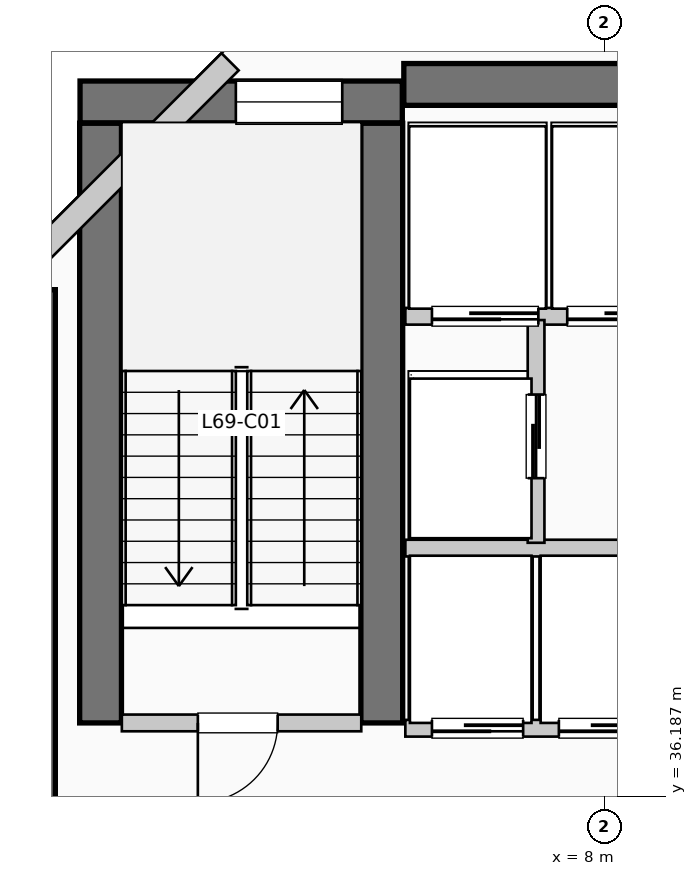
"""IFC4 building model, lengths in metres.
Left out: names, types, materials, properties, quantities, classifications, styles, units other than length and angle.
Written with IfcOpenShell. Run it as: python <this file> out.ifc"""

import sys

from ifc_helpers import new_model, si_unit, direction, frame, frame_2d, origin, place, context, subcontext, project, spatial, rectangle, extrude, element, fill, save


model = new_model("IFC4")
c1 = context("Model", 3, precision=1e-05, world=origin(), true_north=direction((0.0, 1.0)))
c2 = subcontext(c1, "Body", "Model", "MODEL_VIEW")
j1 = project(units=[si_unit("LENGTHUNIT", "METRE"), si_unit("PLANEANGLEUNIT", "RADIAN")], contexts=[c1])
p1 = place(None, origin())
s1 = spatial("IfcSite", under=j1, at=p1, CompositionType="ELEMENT")
p2 = place(p1, origin())
s2 = spatial("IfcBuilding", under=s1, at=p2, CompositionType="ELEMENT")
p3 = place(p2, frame((0.0, 0.0, 284.13)))
s3 = spatial("IfcBuildingStorey", under=s2, at=p3, CompositionType="ELEMENT", Elevation=284.13)
p4 = place(p3, frame((5.36, 45.55, 0.0), z_axis=(0.0, 0.0, 1.0), x_axis=(1.0, 0.0, 0.0)))
e1 = element("IfcWall", 1, at=p4, inside=s3, PredefinedType="SHEAR", context=c2, shape_type="SweptSolid", body=[
    extrude(rectangle(XDim=13.98, YDim=0.55, at=frame_2d((6.99, 0.0))), origin(), (0.0, 0.0, 1.0), 3.96),
])
p5 = place(p3, frame((0.5, 34.95, 0.0), z_axis=(0.0, 0.0, 1.0), x_axis=(0.0, 1.0, 0.0)))
e2 = element("IfcWall", 2, at=p5, inside=s3, PredefinedType="SHEAR", context=c2, shape_type="SweptSolid", body=[
    extrude(rectangle(XDim=7.9, YDim=0.55, at=frame_2d((3.95, 0.0))), origin(), (0.0, 0.0, 1.0), 3.96),
])
for number, where, z_axis, x_axis in (
    (3, (1.37, 37.15, 0.0), (0.0, 0.0, 1.0), (0.0, 1.0, 0.0)),
    (4, (5.07, 37.15, 0.0), (0.0, 0.0, 1.0), (0.0, 1.0, 0.0)),
):
    element("IfcWall", number, at=place(p3, frame(where, z_axis=z_axis, x_axis=x_axis)), inside=s3, PredefinedType="SHEAR", context=c2, shape_type="SweptSolid", body=[
        extrude(rectangle(XDim=7.89, YDim=0.55, at=frame_2d((3.945, 0.0))), origin(), (0.0, 0.0, 1.0), 3.96),
    ])
p6 = place(p3, frame((1.1, 45.32, 0.0), z_axis=(0.0, 0.0, 1.0), x_axis=(1.0, 0.0, 0.0)))
e5 = element("IfcWall", 5, at=p6, inside=s3, PredefinedType="SHEAR", context=c2, shape_type="SweptSolid", body=[
    extrude(rectangle(XDim=4.24, YDim=0.55, at=frame_2d((2.12, 0.0))), origin(), (0.0, 0.0, 1.0), 3.96),
])
p7 = place(p6, frame((2.05, 0.0, 1.05)))
e6 = element("IfcOpeningElement", 6, at=p7, cuts=e5, PredefinedType="OPENING", context=c2, shape_type="SweptSolid", body=[
    extrude(rectangle(XDim=1.4, YDim=1.8, at=frame_2d((0.7, 0.9))), frame((0.0, 0.285, 0.0), z_axis=(0.0, -1.0, 0.0), x_axis=(1.0, 0.0, 0.0)), (0.0, 0.0, 1.0), 0.57),
])
p8 = place(p3, frame((3.074, 45.848, 0.0), z_axis=(0.0, 0.0, 1.0), x_axis=(-0.707106781187, -0.707106781187, 0.0)))
e7 = element("IfcWall", 7, at=p8, inside=s3, PredefinedType="SOLIDWALL", context=c2, shape_type="SweptSolid", body=[
    extrude(rectangle(XDim=4.133, YDim=0.32, at=frame_2d((2.066, 0.0))), origin(), (0.0, 0.0, 1.0), 3.74),
])
p9 = place(p3, frame((1.65, 37.15, 0.0), z_axis=(0.0, 0.0, 1.0), x_axis=(1.0, 0.0, 0.0)))
e8 = element("IfcWall", 8, at=p9, inside=s3, PredefinedType="PARTITIONING", context=c2, shape_type="SweptSolid", body=[
    extrude(rectangle(XDim=3.15, YDim=0.22, at=frame_2d((1.575, 0.0))), origin(), (0.0, 0.0, 1.0), 3.74),
])
p10 = place(p9, frame((2.05, 0.0, 0.0), z_axis=(0.0, 0.0, 1.0), x_axis=(-1.0, 0.0, 0.0)))
e9 = element("IfcOpeningElement", 9, at=p10, cuts=e8, PredefinedType="OPENING", context=c2, shape_type="SweptSolid", body=[
    extrude(rectangle(XDim=1.05, YDim=2.15, at=frame_2d((0.525, 1.075))), frame((0.0, 0.12, 0.0), z_axis=(0.0, -1.0, 0.0), x_axis=(1.0, 0.0, 0.0)), (0.0, 0.0, 1.0), 0.24),
])
p11 = place(p3, frame((5.38, 37.08, 0.0), z_axis=(0.0, 0.0, 1.0), x_axis=(1.0, 0.0, 0.0)))
e10 = element("IfcWall", 10, at=p11, inside=s3, PredefinedType="PARTITIONING", context=c2, shape_type="SweptSolid", body=[
    extrude(rectangle(XDim=3.46, YDim=0.22, at=frame_2d((1.73, 0.0))), origin(), (0.0, 0.0, 1.0), 3.74),
])
p12 = place(p11, frame((1.55, 0.0, 0.0), z_axis=(0.0, 0.0, 1.0), x_axis=(-1.0, 0.0, 0.0)))
e11 = element("IfcOpeningElement", 11, at=p12, cuts=e10, PredefinedType="OPENING", context=c2, shape_type="SweptSolid", body=[
    extrude(rectangle(XDim=1.2, YDim=2.2, at=frame_2d((0.6, 1.1))), frame((0.0, 0.12, 0.0), z_axis=(0.0, -1.0, 0.0), x_axis=(1.0, 0.0, 0.0)), (0.0, 0.0, 1.0), 0.24),
])
p13 = place(p11, frame((3.22, 0.0, 0.0), z_axis=(0.0, 0.0, 1.0), x_axis=(-1.0, 0.0, 0.0)))
e12 = element("IfcOpeningElement", 12, at=p13, cuts=e10, PredefinedType="OPENING", context=c2, shape_type="SweptSolid", body=[
    extrude(rectangle(XDim=1.2, YDim=2.2, at=frame_2d((0.6, 1.1))), frame((0.0, 0.12, 0.0), z_axis=(0.0, -1.0, 0.0), x_axis=(1.0, 0.0, 0.0)), (0.0, 0.0, 1.0), 0.24),
])
p14 = place(p3, frame((5.38, 39.45, 0.0), z_axis=(0.0, 0.0, 1.0), x_axis=(1.0, 0.0, 0.0)))
e13 = element("IfcWall", 13, at=p14, inside=s3, PredefinedType="PARTITIONING", context=c2, shape_type="SweptSolid", body=[
    extrude(rectangle(XDim=3.46, YDim=0.22, at=frame_2d((1.73, 0.0))), origin(), (0.0, 0.0, 1.0), 3.74),
])
p15 = place(p3, frame((5.38, 42.5, 0.0), z_axis=(0.0, 0.0, 1.0), x_axis=(1.0, 0.0, 0.0)))
e14 = element("IfcWall", 14, at=p15, inside=s3, PredefinedType="PARTITIONING", context=c2, shape_type="SweptSolid", body=[
    extrude(rectangle(XDim=3.77, YDim=0.22, at=frame_2d((1.885, 0.0))), origin(), (0.0, 0.0, 1.0), 3.74),
])
p16 = place(p15, frame((1.75, 0.0, 0.0), z_axis=(0.0, 0.0, 1.0), x_axis=(-1.0, 0.0, 0.0)))
e15 = element("IfcOpeningElement", 15, at=p16, cuts=e14, PredefinedType="OPENING", context=c2, shape_type="SweptSolid", body=[
    extrude(rectangle(XDim=1.4, YDim=2.2, at=frame_2d((0.7, 1.1))), frame((0.0, 0.12, 0.0), z_axis=(0.0, -1.0, 0.0), x_axis=(1.0, 0.0, 0.0)), (0.0, 0.0, 1.0), 0.24),
])
p17 = place(p15, frame((3.53, 0.0, 0.0), z_axis=(0.0, 0.0, 1.0), x_axis=(-1.0, 0.0, 0.0)))
e16 = element("IfcOpeningElement", 16, at=p17, cuts=e14, PredefinedType="OPENING", context=c2, shape_type="SweptSolid", body=[
    extrude(rectangle(XDim=1.4, YDim=2.2, at=frame_2d((0.7, 1.1))), frame((0.0, 0.12, 0.0), z_axis=(0.0, -1.0, 0.0), x_axis=(1.0, 0.0, 0.0)), (0.0, 0.0, 1.0), 0.24),
])
p18 = place(p3, frame((7.1, 39.52, 0.0), z_axis=(0.0, 0.0, 1.0), x_axis=(0.0, 1.0, 0.0)))
e17 = element("IfcWall", 17, at=p18, inside=s3, PredefinedType="PARTITIONING", context=c2, shape_type="SweptSolid", body=[
    extrude(rectangle(XDim=2.93, YDim=0.22, at=frame_2d((1.465, 0.0))), origin(), (0.0, 0.0, 1.0), 3.74),
])
p19 = place(p18, frame((0.85, 0.0, 0.0)))
e18 = element("IfcOpeningElement", 18, at=p19, cuts=e17, PredefinedType="OPENING", context=c2, shape_type="SweptSolid", body=[
    extrude(rectangle(XDim=1.1, YDim=2.2, at=frame_2d((0.55, 1.1))), frame((0.0, 0.12, 0.0), z_axis=(0.0, -1.0, 0.0), x_axis=(1.0, 0.0, 0.0)), (0.0, 0.0, 1.0), 0.24),
])
p20 = place(p7, origin())
e19 = element("IfcWindow", 19, at=p20, inside=s3, PartitioningType="SINGLE_PANEL", PredefinedType="WINDOW", context=c2, shape_type="SweptSolid", body=[
    extrude(rectangle(XDim=1.4, YDim=1.8, at=frame_2d((0.7, 0.9))), frame((0.0, 0.03, 0.0), z_axis=(0.0, -1.0, 0.0), x_axis=(1.0, 0.0, 0.0)), (0.0, 0.0, 1.0), 0.06),
])
fill(e6, e19)
p21 = place(p10, origin())
e20 = element("IfcDoor", 20, at=p21, inside=s3, OperationType="SINGLE_SWING_LEFT", PredefinedType="DOOR", context=c2, shape_type="SweptSolid", body=[
    extrude(rectangle(XDim=1.05, YDim=2.15, at=frame_2d((0.525, 1.075))), frame((0.0, 0.025, 0.0), z_axis=(0.0, -1.0, 0.0), x_axis=(1.0, 0.0, 0.0)), (0.0, 0.0, 1.0), 0.05),
])
fill(e9, e20)
p22 = place(p12, origin())
e21 = element("IfcDoor", 21, at=p22, inside=s3, OperationType="SLIDING_TO_RIGHT", PredefinedType="DOOR", context=c2, shape_type="SweptSolid", body=[
    extrude(rectangle(XDim=1.2, YDim=2.2, at=frame_2d((0.6, 1.1))), frame((0.0, 0.025, 0.0), z_axis=(0.0, -1.0, 0.0), x_axis=(1.0, 0.0, 0.0)), (0.0, 0.0, 1.0), 0.05),
])
fill(e11, e21)
p23 = place(p13, origin())
e22 = element("IfcDoor", 22, at=p23, inside=s3, OperationType="SLIDING_TO_RIGHT", PredefinedType="DOOR", context=c2, shape_type="SweptSolid", body=[
    extrude(rectangle(XDim=1.2, YDim=2.2, at=frame_2d((0.6, 1.1))), frame((0.0, 0.025, 0.0), z_axis=(0.0, -1.0, 0.0), x_axis=(1.0, 0.0, 0.0)), (0.0, 0.0, 1.0), 0.05),
])
fill(e12, e22)
p24 = place(p16, origin())
e23 = element("IfcDoor", 23, at=p24, inside=s3, OperationType="SLIDING_TO_LEFT", PredefinedType="DOOR", context=c2, shape_type="SweptSolid", body=[
    extrude(rectangle(XDim=1.4, YDim=2.2, at=frame_2d((0.7, 1.1))), frame((0.0, 0.025, 0.0), z_axis=(0.0, -1.0, 0.0), x_axis=(1.0, 0.0, 0.0)), (0.0, 0.0, 1.0), 0.05),
])
fill(e15, e23)
p25 = place(p17, origin())
e24 = element("IfcDoor", 24, at=p25, inside=s3, OperationType="SLIDING_TO_LEFT", PredefinedType="DOOR", context=c2, shape_type="SweptSolid", body=[
    extrude(rectangle(XDim=1.4, YDim=2.2, at=frame_2d((0.7, 1.1))), frame((0.0, 0.025, 0.0), z_axis=(0.0, -1.0, 0.0), x_axis=(1.0, 0.0, 0.0)), (0.0, 0.0, 1.0), 0.05),
])
fill(e16, e24)
p26 = place(p19, origin())
e25 = element("IfcDoor", 25, at=p26, inside=s3, OperationType="SLIDING_TO_LEFT", PredefinedType="DOOR", context=c2, shape_type="SweptSolid", body=[
    extrude(rectangle(XDim=1.1, YDim=2.2, at=frame_2d((0.55, 1.1))), frame((0.0, 0.025, 0.0), z_axis=(0.0, -1.0, 0.0), x_axis=(1.0, 0.0, 0.0)), (0.0, 0.0, 1.0), 0.05),
])
fill(e18, e25)
save(model, sys.argv[1])
